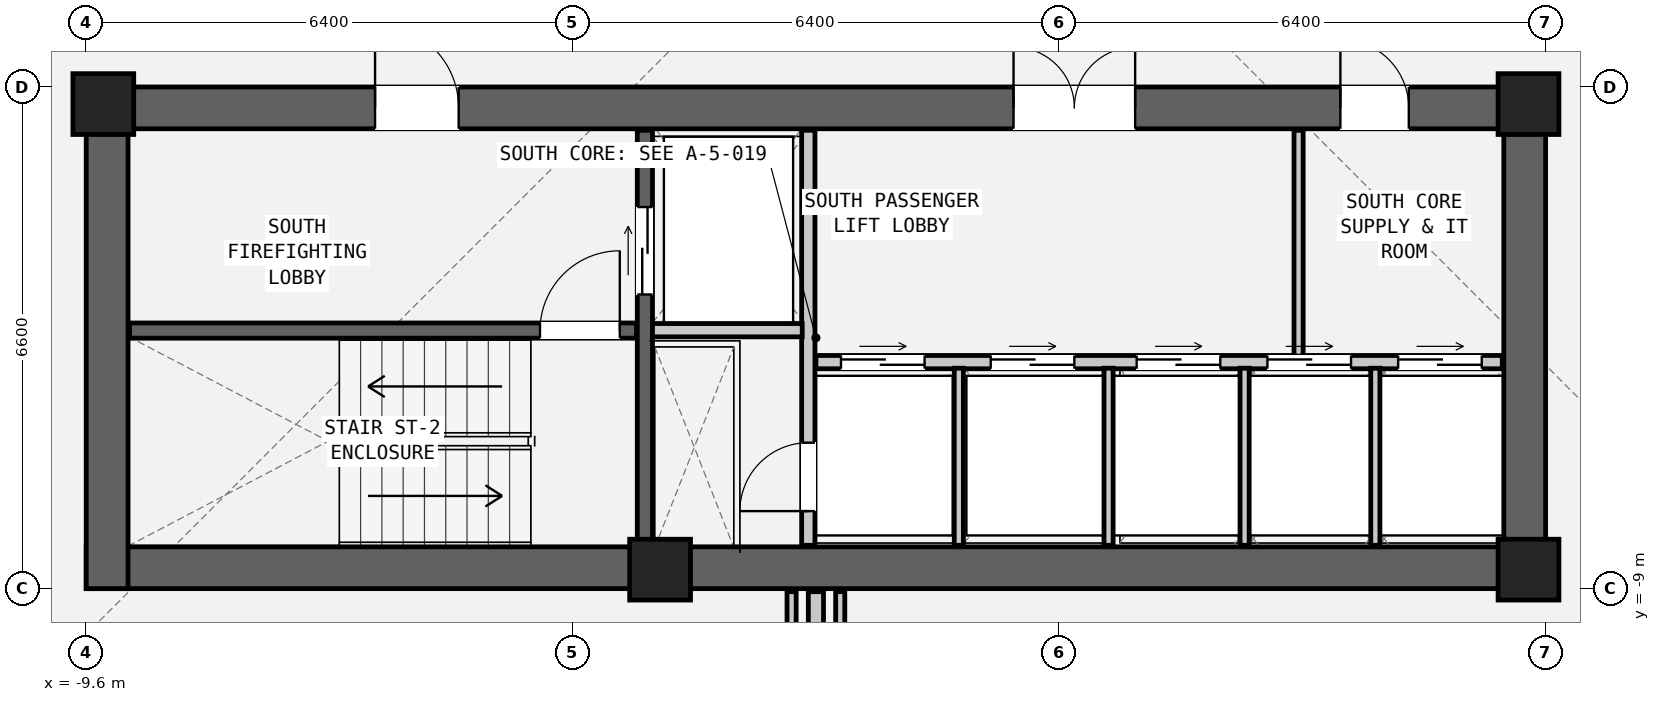
"""IFC4 building model, lengths in metres.
Left out: names, types, materials, properties, quantities, classifications, styles, units other than length and angle.
Written with IfcOpenShell. Run it as: python <this file> out.ifc"""

import sys

from ifc_helpers import new_model, si_unit, direction, frame, frame_2d, origin, origin_2d, place, context, subcontext, project, spatial, rectangle, extrude, element, fill, save


model = new_model("IFC4")
c1 = context("Model", 3, precision=1e-05, world=origin(), true_north=direction((0.0, 1.0)))
c2 = subcontext(c1, "Body", "Model", "MODEL_VIEW")
j1 = project(units=[si_unit("LENGTHUNIT", "METRE"), si_unit("PLANEANGLEUNIT", "RADIAN")], contexts=[c1])
p1 = place(None, origin())
s1 = spatial("IfcSite", under=j1, at=p1, CompositionType="ELEMENT")
p2 = place(p1, origin())
s2 = spatial("IfcBuilding", under=s1, at=p2, CompositionType="ELEMENT")
p3 = place(p2, frame((0.0, 0.0, 57.9)))
s3 = spatial("IfcBuildingStorey", under=s2, at=p3, CompositionType="ELEMENT", Elevation=57.9)
p4 = place(p3, frame((-9.6, -8.725, 0.0), z_axis=(0.0, 0.0, 1.0), x_axis=(1.0, 0.0, 0.0)))
e1 = element("IfcWall", 1, at=p4, inside=s3, PredefinedType="SHEAR", context=c2, shape_type="SweptSolid", body=[
    extrude(rectangle(XDim=19.2, YDim=0.55, at=frame_2d((9.6, 0.0))), origin(), (0.0, 0.0, 1.0), 3.6),
])
p5 = place(p3, frame((-9.6, -2.675, 0.0), z_axis=(0.0, 0.0, 1.0), x_axis=(1.0, 0.0, 0.0)))
e2 = element("IfcWall", 2, at=p5, inside=s3, PredefinedType="SHEAR", context=c2, shape_type="SweptSolid", body=[
    extrude(rectangle(XDim=19.2, YDim=0.55, at=frame_2d((9.6, 0.0))), origin(), (0.0, 0.0, 1.0), 3.6),
])
p6 = place(p5, frame((3.8, 0.0, 0.0)))
e3 = element("IfcOpeningElement", 3, at=p6, cuts=e2, PredefinedType="OPENING", context=c2, shape_type="SweptSolid", body=[
    extrude(rectangle(XDim=1.1, YDim=2.08, at=frame_2d((0.55, 1.04))), frame((0.0, 0.287, 0.0), z_axis=(0.0, -1.0, 0.0), x_axis=(1.0, 0.0, 0.0)), (0.0, 0.0, 1.0), 0.574),
])
p7 = place(p5, frame((12.2, 0.0, 0.0)))
e4 = element("IfcOpeningElement", 4, at=p7, cuts=e2, PredefinedType="OPENING", context=c2, shape_type="SweptSolid", body=[
    extrude(rectangle(XDim=1.6, YDim=2.12, at=frame_2d((0.8, 1.06))), frame((0.0, 0.287, 0.0), z_axis=(0.0, -1.0, 0.0), x_axis=(1.0, 0.0, 0.0)), (0.0, 0.0, 1.0), 0.574),
])
p8 = place(p5, frame((16.5, 0.0, 0.0)))
e5 = element("IfcOpeningElement", 5, at=p8, cuts=e2, PredefinedType="OPENING", context=c2, shape_type="SweptSolid", body=[
    extrude(rectangle(XDim=0.9, YDim=2.05, at=frame_2d((0.45, 1.025))), frame((0.0, 0.287, 0.0), z_axis=(0.0, -1.0, 0.0), x_axis=(1.0, 0.0, 0.0)), (0.0, 0.0, 1.0), 0.574),
])
for number, where, z_axis, x_axis in (
    (6, (-9.325, -9.0, 0.0), (0.0, 0.0, 1.0), (0.0, 1.0, 0.0)),
    (7, (9.325, -9.0, 0.0), (0.0, 0.0, 1.0), (0.0, 1.0, 0.0)),
):
    element("IfcWall", number, at=place(p3, frame(where, z_axis=z_axis, x_axis=x_axis)), inside=s3, PredefinedType="SHEAR", context=c2, shape_type="SweptSolid", body=[
        extrude(rectangle(XDim=6.6, YDim=0.55, at=frame_2d((3.3, 0.0))), origin(), (0.0, 0.0, 1.0), 3.6),
    ])
for number, where, z_axis, x_axis in (
    (8, (-9.375, -2.625, 0.0), (0.0, 0.0, 1.0), (1.0, 0.0, 0.0)),
    (9, (9.375, -2.625, 0.0), (0.0, 0.0, 1.0), (1.0, 0.0, 0.0)),
    (10, (-2.05, -8.75, 0.0), (0.0, 0.0, 1.0), (1.0, 0.0, 0.0)),
    (11, (9.375, -8.75, 0.0), (0.0, 0.0, 1.0), (1.0, 0.0, 0.0)),
):
    element("IfcColumn", number, at=place(p3, frame(where, z_axis=z_axis, x_axis=x_axis)), inside=s3, PredefinedType="COLUMN", context=c2, shape_type="SweptSolid", body=[
        extrude(rectangle(XDim=0.8, YDim=0.8, at=origin_2d()), origin(), (0.0, 0.0, 1.0), 3.6),
    ])
p9 = place(p3, frame((-9.03, -5.605, 0.0), z_axis=(0.0, 0.0, 1.0), x_axis=(1.0, 0.0, 0.0)))
e12 = element("IfcWall", 12, at=p9, inside=s3, PredefinedType="SHEAR", context=c2, shape_type="SweptSolid", body=[
    extrude(rectangle(XDim=6.67, YDim=0.2, at=frame_2d((3.335, 0.0))), origin(), (0.0, 0.0, 1.0), 3.38),
])
p10 = place(p9, frame((5.4, 0.0, 0.0)))
e13 = element("IfcOpeningElement", 13, at=p10, cuts=e12, PredefinedType="OPENING", context=c2, shape_type="SweptSolid", body=[
    extrude(rectangle(XDim=1.05, YDim=2.08, at=frame_2d((0.525, 1.04))), frame((0.0, 0.112, 0.0), z_axis=(0.0, -1.0, 0.0), x_axis=(1.0, 0.0, 0.0)), (0.0, 0.0, 1.0), 0.224),
])
p11 = place(p3, frame((-2.25, -8.43, 0.0), z_axis=(0.0, 0.0, 1.0), x_axis=(0.0, 1.0, 0.0)))
e14 = element("IfcWall", 14, at=p11, inside=s3, PredefinedType="SHEAR", context=c2, shape_type="SweptSolid", body=[
    extrude(rectangle(XDim=5.46, YDim=0.2, at=frame_2d((2.73, 0.0))), origin(), (0.0, 0.0, 1.0), 3.38),
])
p12 = place(p11, frame((3.3, 0.0, 0.0)))
e15 = element("IfcOpeningElement", 15, at=p12, cuts=e14, PredefinedType="OPENING", context=c2, shape_type="SweptSolid", body=[
    extrude(rectangle(XDim=1.15, YDim=2.08, at=frame_2d((0.575, 1.04))), frame((0.0, 0.112, 0.0), z_axis=(0.0, -1.0, 0.0), x_axis=(1.0, 0.0, 0.0)), (0.0, 0.0, 1.0), 0.224),
])
p13 = place(p3, frame((-0.1, -8.43, 0.0), z_axis=(0.0, 0.0, 1.0), x_axis=(0.0, 1.0, 0.0)))
e16 = element("IfcWall", 16, at=p13, inside=s3, PredefinedType="PARTITIONING", context=c2, shape_type="SweptSolid", body=[
    extrude(rectangle(XDim=5.46, YDim=0.175, at=frame_2d((2.73, 0.0))), origin(), (0.0, 0.0, 1.0), 3.38),
])
p14 = place(p13, frame((0.45, 0.0, 0.0)))
e17 = element("IfcOpeningElement", 17, at=p14, cuts=e16, PredefinedType="OPENING", context=c2, shape_type="SweptSolid", body=[
    extrude(rectangle(XDim=0.9, YDim=2.05, at=frame_2d((0.45, 1.025))), frame((0.0, 0.1, 0.0), z_axis=(0.0, -1.0, 0.0), x_axis=(1.0, 0.0, 0.0)), (0.0, 0.0, 1.0), 0.199),
])
p15 = place(p3, frame((-2.15, -5.6, 0.0), z_axis=(0.0, 0.0, 1.0), x_axis=(1.0, 0.0, 0.0)))
e18 = element("IfcWall", 18, at=p15, inside=s3, PredefinedType="PARTITIONING", context=c2, shape_type="SweptSolid", body=[
    extrude(rectangle(XDim=1.97, YDim=0.175, at=frame_2d((0.985, 0.0))), origin(), (0.0, 0.0, 1.0), 3.38),
])
p16 = place(p3, frame((0.0, -6.02, 0.0), z_axis=(0.0, 0.0, 1.0), x_axis=(1.0, 0.0, 0.0)))
e19 = element("IfcWall", 19, at=p16, inside=s3, PredefinedType="PARTITIONING", context=c2, shape_type="SweptSolid", body=[
    extrude(rectangle(XDim=9.03, YDim=0.175, at=frame_2d((4.515, 0.0))), origin(), (0.0, 0.0, 1.0), 3.38),
])
p17 = place(p16, frame((0.33, 0.0, 0.0)))
e20 = element("IfcOpeningElement", 20, at=p17, cuts=e19, PredefinedType="OPENING", context=c2, shape_type="SweptSolid", body=[
    extrude(rectangle(XDim=1.1, YDim=2.06, at=frame_2d((0.55, 1.03))), frame((0.0, 0.1, 0.0), z_axis=(0.0, -1.0, 0.0), x_axis=(1.0, 0.0, 0.0)), (0.0, 0.0, 1.0), 0.199),
])
p18 = place(p16, frame((2.3, 0.0, 0.0)))
e21 = element("IfcOpeningElement", 21, at=p18, cuts=e19, PredefinedType="OPENING", context=c2, shape_type="SweptSolid", body=[
    extrude(rectangle(XDim=1.1, YDim=2.06, at=frame_2d((0.55, 1.03))), frame((0.0, 0.1, 0.0), z_axis=(0.0, -1.0, 0.0), x_axis=(1.0, 0.0, 0.0)), (0.0, 0.0, 1.0), 0.199),
])
p19 = place(p16, frame((4.22, 0.0, 0.0)))
e22 = element("IfcOpeningElement", 22, at=p19, cuts=e19, PredefinedType="OPENING", context=c2, shape_type="SweptSolid", body=[
    extrude(rectangle(XDim=1.1, YDim=2.06, at=frame_2d((0.55, 1.03))), frame((0.0, 0.1, 0.0), z_axis=(0.0, -1.0, 0.0), x_axis=(1.0, 0.0, 0.0)), (0.0, 0.0, 1.0), 0.199),
])
p20 = place(p16, frame((5.94, 0.0, 0.0)))
e23 = element("IfcOpeningElement", 23, at=p20, cuts=e19, PredefinedType="OPENING", context=c2, shape_type="SweptSolid", body=[
    extrude(rectangle(XDim=1.1, YDim=2.06, at=frame_2d((0.55, 1.03))), frame((0.0, 0.1, 0.0), z_axis=(0.0, -1.0, 0.0), x_axis=(1.0, 0.0, 0.0)), (0.0, 0.0, 1.0), 0.199),
])
p21 = place(p16, frame((7.66, 0.0, 0.0)))
e24 = element("IfcOpeningElement", 24, at=p21, cuts=e19, PredefinedType="OPENING", context=c2, shape_type="SweptSolid", body=[
    extrude(rectangle(XDim=1.1, YDim=2.06, at=frame_2d((0.55, 1.03))), frame((0.0, 0.1, 0.0), z_axis=(0.0, -1.0, 0.0), x_axis=(1.0, 0.0, 0.0)), (0.0, 0.0, 1.0), 0.199),
])
for number, where, z_axis, x_axis in (
    (25, (1.88, -8.43, 0.0), (0.0, 0.0, 1.0), (0.0, 1.0, 0.0)),
    (26, (3.85, -8.43, 0.0), (0.0, 0.0, 1.0), (0.0, 1.0, 0.0)),
    (27, (5.64, -8.43, 0.0), (0.0, 0.0, 1.0), (0.0, 1.0, 0.0)),
    (28, (7.36, -8.43, 0.0), (0.0, 0.0, 1.0), (0.0, 1.0, 0.0)),
):
    element("IfcWall", number, at=place(p3, frame(where, z_axis=z_axis, x_axis=x_axis)), inside=s3, PredefinedType="PARTITIONING", context=c2, shape_type="SweptSolid", body=[
        extrude(rectangle(XDim=2.33, YDim=0.12, at=frame_2d((1.165, 0.0))), origin(), (0.0, 0.0, 1.0), 3.38),
    ])
p22 = place(p3, frame((6.35, -5.94, 0.0), z_axis=(0.0, 0.0, 1.0), x_axis=(0.0, 1.0, 0.0)))
e29 = element("IfcWall", 29, at=p22, inside=s3, PredefinedType="PARTITIONING", context=c2, shape_type="SweptSolid", body=[
    extrude(rectangle(XDim=2.97, YDim=0.12, at=frame_2d((1.485, 0.0))), origin(), (0.0, 0.0, 1.0), 3.38),
])
p23 = place(p3, frame((0.0, -19.51, 0.0), z_axis=(0.0, 0.0, 1.0), x_axis=(0.0, 1.0, 0.0)))
e30 = element("IfcWall", 30, at=p23, inside=s3, PredefinedType="PARTITIONING", context=c2, shape_type="SweptSolid", body=[
    extrude(rectangle(XDim=10.47, YDim=0.2, at=frame_2d((5.235, 0.0))), origin(), (0.0, 0.0, 1.0), 2.901),
])
for number, where, z_axis, x_axis in (
    (31, (-0.32, -11.4, 0.0), (0.0, 0.0, 1.0), (0.0, 1.0, 0.0)),
    (32, (0.32, -11.4, 0.0), (0.0, 0.0, 1.0), (0.0, 1.0, 0.0)),
):
    element("IfcWall", number, at=place(p3, frame(where, z_axis=z_axis, x_axis=x_axis)), inside=s3, PredefinedType="PARTITIONING", context=c2, shape_type="SweptSolid", body=[
        extrude(rectangle(XDim=2.36, YDim=0.12, at=frame_2d((1.18, 0.0))), origin(), (0.0, 0.0, 1.0), 2.901),
    ])
p24 = place(p10, origin())
e33 = element("IfcDoor", 33, at=p24, inside=s3, OperationType="SINGLE_SWING_RIGHT", PredefinedType="DOOR", context=c2, shape_type="SweptSolid", body=[
    extrude(rectangle(XDim=1.05, YDim=2.08, at=frame_2d((0.525, 1.04))), frame((0.0, 0.025, 0.0), z_axis=(0.0, -1.0, 0.0), x_axis=(1.0, 0.0, 0.0)), (0.0, 0.0, 1.0), 0.05),
])
fill(e13, e33)
p25 = place(p6, origin())
e34 = element("IfcDoor", 34, at=p25, inside=s3, OperationType="SINGLE_SWING_LEFT", PredefinedType="DOOR", context=c2, shape_type="SweptSolid", body=[
    extrude(rectangle(XDim=1.1, YDim=2.08, at=frame_2d((0.55, 1.04))), frame((0.0, 0.025, 0.0), z_axis=(0.0, -1.0, 0.0), x_axis=(1.0, 0.0, 0.0)), (0.0, 0.0, 1.0), 0.05),
])
fill(e3, e34)
p26 = place(p12, origin())
e35 = element("IfcDoor", 35, at=p26, inside=s3, OperationType="DOUBLE_DOOR_SLIDING", PredefinedType="DOOR", context=c2, shape_type="SweptSolid", body=[
    extrude(rectangle(XDim=1.15, YDim=2.08, at=frame_2d((0.575, 1.04))), frame((0.0, 0.025, 0.0), z_axis=(0.0, -1.0, 0.0), x_axis=(1.0, 0.0, 0.0)), (0.0, 0.0, 1.0), 0.05),
])
fill(e15, e35)
p27 = place(p14, origin())
e36 = element("IfcDoor", 36, at=p27, inside=s3, OperationType="SINGLE_SWING_LEFT", PredefinedType="DOOR", context=c2, shape_type="SweptSolid", body=[
    extrude(rectangle(XDim=0.9, YDim=2.05, at=frame_2d((0.45, 1.025))), frame((0.0, 0.025, 0.0), z_axis=(0.0, -1.0, 0.0), x_axis=(1.0, 0.0, 0.0)), (0.0, 0.0, 1.0), 0.05),
])
fill(e17, e36)
p28 = place(p7, origin())
e37 = element("IfcDoor", 37, at=p28, inside=s3, OperationType="DOUBLE_DOOR_SINGLE_SWING", PredefinedType="DOOR", context=c2, shape_type="SweptSolid", body=[
    extrude(rectangle(XDim=1.6, YDim=2.12, at=frame_2d((0.8, 1.06))), frame((0.0, 0.025, 0.0), z_axis=(0.0, -1.0, 0.0), x_axis=(1.0, 0.0, 0.0)), (0.0, 0.0, 1.0), 0.05),
])
fill(e4, e37)
p29 = place(p8, origin())
e38 = element("IfcDoor", 38, at=p29, inside=s3, OperationType="SINGLE_SWING_LEFT", PredefinedType="DOOR", context=c2, shape_type="SweptSolid", body=[
    extrude(rectangle(XDim=0.9, YDim=2.05, at=frame_2d((0.45, 1.025))), frame((0.0, 0.025, 0.0), z_axis=(0.0, -1.0, 0.0), x_axis=(1.0, 0.0, 0.0)), (0.0, 0.0, 1.0), 0.05),
])
fill(e5, e38)
p30 = place(p17, origin())
e39 = element("IfcDoor", 39, at=p30, inside=s3, OperationType="DOUBLE_DOOR_SLIDING", PredefinedType="DOOR", context=c2, shape_type="SweptSolid", body=[
    extrude(rectangle(XDim=1.1, YDim=2.06, at=frame_2d((0.55, 1.03))), frame((0.0, 0.025, 0.0), z_axis=(0.0, -1.0, 0.0), x_axis=(1.0, 0.0, 0.0)), (0.0, 0.0, 1.0), 0.05),
])
fill(e20, e39)
p31 = place(p18, origin())
e40 = element("IfcDoor", 40, at=p31, inside=s3, OperationType="DOUBLE_DOOR_SLIDING", PredefinedType="DOOR", context=c2, shape_type="SweptSolid", body=[
    extrude(rectangle(XDim=1.1, YDim=2.06, at=frame_2d((0.55, 1.03))), frame((0.0, 0.025, 0.0), z_axis=(0.0, -1.0, 0.0), x_axis=(1.0, 0.0, 0.0)), (0.0, 0.0, 1.0), 0.05),
])
fill(e21, e40)
p32 = place(p19, origin())
e41 = element("IfcDoor", 41, at=p32, inside=s3, OperationType="DOUBLE_DOOR_SLIDING", PredefinedType="DOOR", context=c2, shape_type="SweptSolid", body=[
    extrude(rectangle(XDim=1.1, YDim=2.06, at=frame_2d((0.55, 1.03))), frame((0.0, 0.025, 0.0), z_axis=(0.0, -1.0, 0.0), x_axis=(1.0, 0.0, 0.0)), (0.0, 0.0, 1.0), 0.05),
])
fill(e22, e41)
p33 = place(p20, origin())
e42 = element("IfcDoor", 42, at=p33, inside=s3, OperationType="DOUBLE_DOOR_SLIDING", PredefinedType="DOOR", context=c2, shape_type="SweptSolid", body=[
    extrude(rectangle(XDim=1.1, YDim=2.06, at=frame_2d((0.55, 1.03))), frame((0.0, 0.025, 0.0), z_axis=(0.0, -1.0, 0.0), x_axis=(1.0, 0.0, 0.0)), (0.0, 0.0, 1.0), 0.05),
])
fill(e23, e42)
p34 = place(p21, origin())
e43 = element("IfcDoor", 43, at=p34, inside=s3, OperationType="DOUBLE_DOOR_SLIDING", PredefinedType="DOOR", context=c2, shape_type="SweptSolid", body=[
    extrude(rectangle(XDim=1.1, YDim=2.06, at=frame_2d((0.55, 1.03))), frame((0.0, 0.025, 0.0), z_axis=(0.0, -1.0, 0.0), x_axis=(1.0, 0.0, 0.0)), (0.0, 0.0, 1.0), 0.05),
])
fill(e24, e43)
save(model, sys.argv[1])
